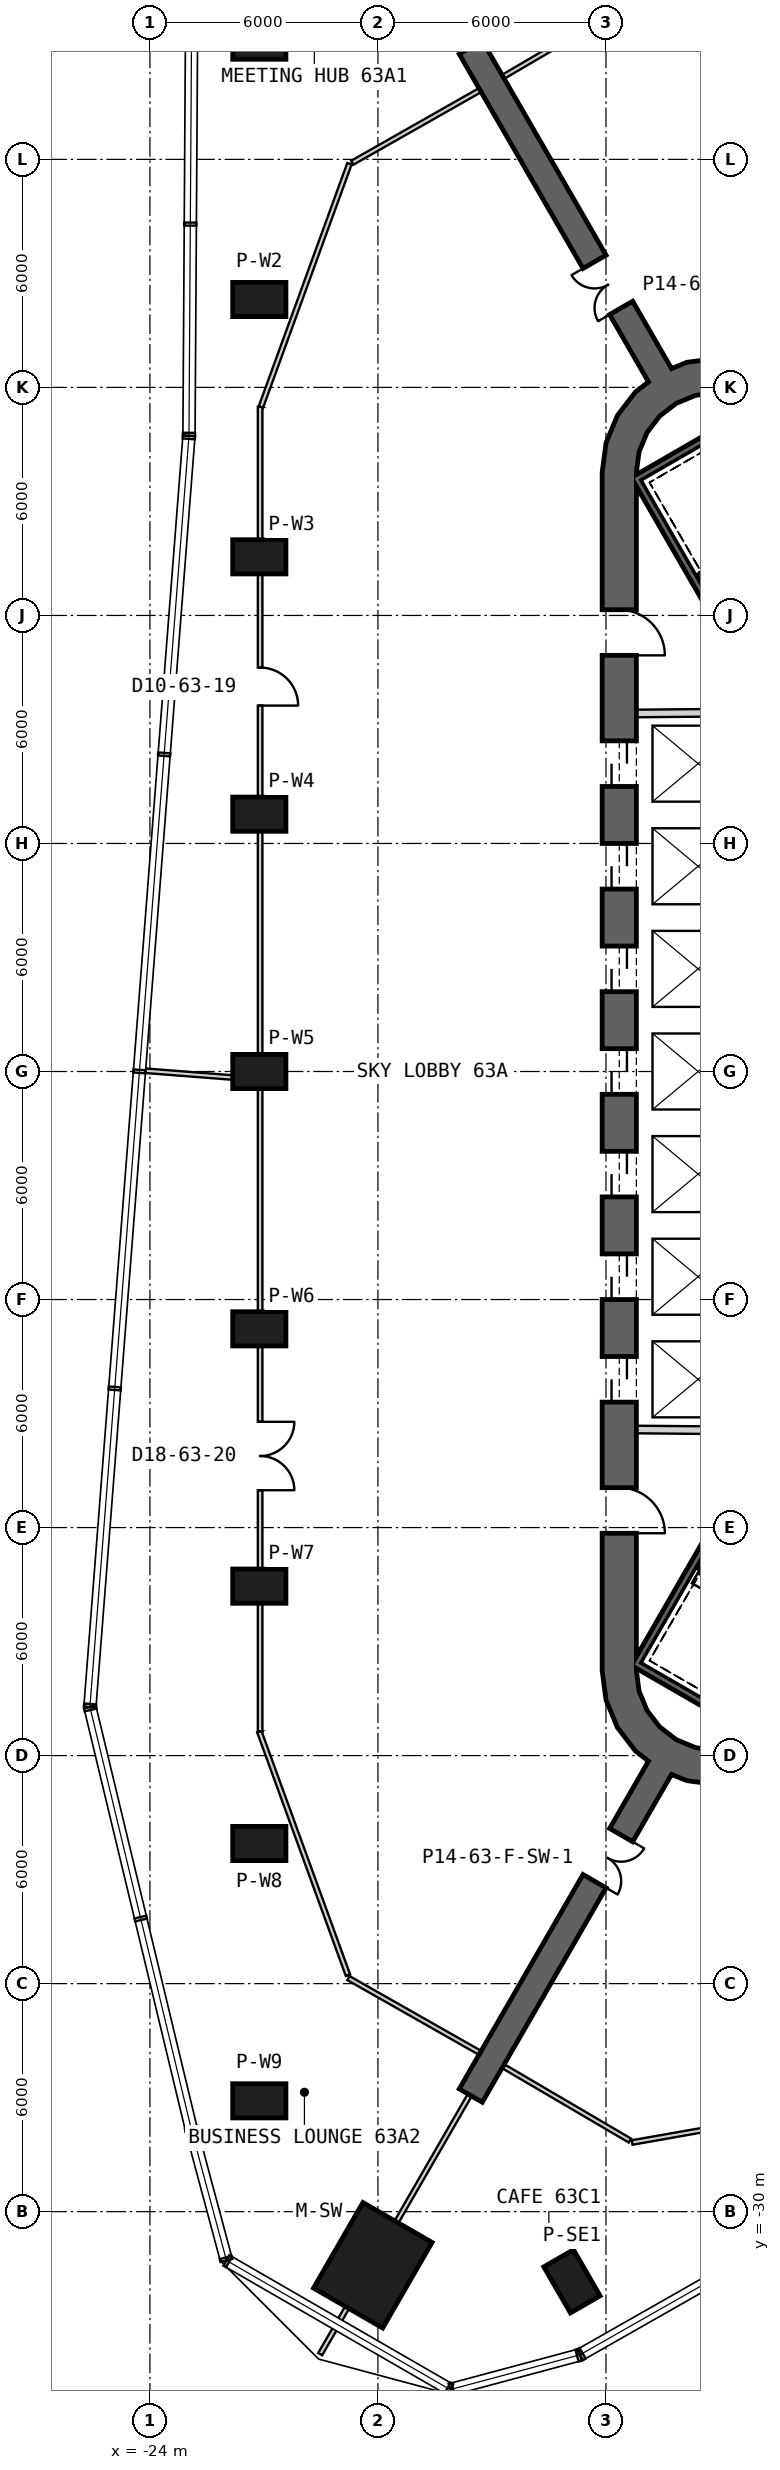
"""IFC4 building model, lengths in metres.
Left out: names, types, materials, properties, quantities, classifications, styles, units other than length and angle.
Written with IfcOpenShell. Run it as: python <this file> out.ifc"""

import sys

from ifc_helpers import new_model, si_unit, direction, frame, frame_2d, origin, origin_2d, place, context, subcontext, project, spatial, polyline, rectangle, outline, extrude, element, fill, save


model = new_model("IFC4")
c1 = context("Model", 3, precision=1e-05, world=origin(), true_north=direction((0.0, 1.0)))
c2 = subcontext(c1, "Body", "Model", "MODEL_VIEW")
j1 = project(units=[si_unit("LENGTHUNIT", "METRE"), si_unit("PLANEANGLEUNIT", "RADIAN")], contexts=[c1])
p1 = place(None, origin())
s1 = spatial("IfcSite", under=j1, at=p1, CompositionType="ELEMENT")
p2 = place(p1, origin())
s2 = spatial("IfcBuilding", under=s1, at=p2, CompositionType="ELEMENT")
p3 = place(p2, frame((0.0, 0.0, 277.2)))
s3 = spatial("IfcBuildingStorey", under=s2, at=p3, CompositionType="ELEMENT", Elevation=277.2)
p4 = place(p3, frame((-18.135, -31.411, 0.0), z_axis=(0.0, 0.0, 1.0), x_axis=(-0.5, -0.866025403784, 0.0)))
e1 = element("IfcColumn", 1, at=p4, inside=s3, PredefinedType="COLUMN", context=c2, shape_type="SweptSolid", body=[
    extrude(rectangle(XDim=2.6, YDim=2.1, at=origin_2d()), origin(), (0.0, 0.0, 1.0), 6.5),
])
for number, where, z_axis, x_axis in (
    (2, (-21.121, 27.084, 0.0), (0.0, 0.0, 1.0), (-1.0, 0.0, 0.0)),
    (3, (-21.121, 20.313, 0.0), (0.0, 0.0, 1.0), (-1.0, 0.0, 0.0)),
    (4, (-21.121, 13.542, 0.0), (0.0, 0.0, 1.0), (-1.0, 0.0, 0.0)),
    (5, (-21.121, 6.771, 0.0), (0.0, 0.0, 1.0), (-1.0, 0.0, 0.0)),
    (6, (-21.121, 0.0, 0.0), (0.0, 0.0, 1.0), (-1.0, 0.0, 0.0)),
    (7, (-21.121, -6.771, 0.0), (0.0, 0.0, 1.0), (-1.0, 0.0, 0.0)),
    (8, (-21.121, -13.542, 0.0), (0.0, 0.0, 1.0), (-1.0, 0.0, 0.0)),
    (9, (-21.121, -20.313, 0.0), (0.0, 0.0, 1.0), (-1.0, 0.0, 0.0)),
    (10, (-21.121, -27.084, 0.0), (0.0, 0.0, 1.0), (-1.0, 0.0, 0.0)),
    (11, (-12.895, -31.833, 0.0), (0.0, 0.0, 1.0), (0.5, -0.866, 0.0)),
):
    element("IfcColumn", number, at=place(p3, frame(where, z_axis=z_axis, x_axis=x_axis)), inside=s3, PredefinedType="COLUMN", context=c2, shape_type="SweptSolid", body=[
        extrude(rectangle(XDim=1.4, YDim=0.9, at=origin_2d()), origin(), (0.0, 0.0, 1.0), 6.5),
    ])
p5 = place(p3, frame((-11.65, 15.762, 0.0), z_axis=(0.0, 0.0, 1.0), x_axis=(0.0, -1.0, 0.0)))
e12 = element("IfcWall", 12, at=p5, inside=s3, PredefinedType="SHEAR", context=c2, shape_type="SweptSolid", body=[
    extrude(rectangle(XDim=31.523, YDim=0.9, at=frame_2d((15.762, 0.0))), origin(), (0.0, 0.0, 1.0), 6.5),
])
p6 = place(p5, frame((7.062, 0.0, 0.0)))
e13 = element("IfcOpeningElement", 13, at=p6, cuts=e12, PredefinedType="OPENING", context=c2, shape_type="SweptSolid", body=[
    extrude(rectangle(XDim=1.2, YDim=2.4, at=frame_2d((0.6, 1.2))), frame((0.0, 0.46, 0.0), z_axis=(0.0, -1.0, 0.0), x_axis=(1.0, 0.0, 0.0)), (0.0, 0.0, 1.0), 0.92),
])
p7 = place(p5, frame((9.762, 0.0, 0.0)))
e14 = element("IfcOpeningElement", 14, at=p7, cuts=e12, PredefinedType="OPENING", context=c2, shape_type="SweptSolid", body=[
    extrude(rectangle(XDim=1.2, YDim=2.4, at=frame_2d((0.6, 1.2))), frame((0.0, 0.46, 0.0), z_axis=(0.0, -1.0, 0.0), x_axis=(1.0, 0.0, 0.0)), (0.0, 0.0, 1.0), 0.92),
])
p8 = place(p5, frame((12.462, 0.0, 0.0)))
e15 = element("IfcOpeningElement", 15, at=p8, cuts=e12, PredefinedType="OPENING", context=c2, shape_type="SweptSolid", body=[
    extrude(rectangle(XDim=1.2, YDim=2.4, at=frame_2d((0.6, 1.2))), frame((0.0, 0.46, 0.0), z_axis=(0.0, -1.0, 0.0), x_axis=(1.0, 0.0, 0.0)), (0.0, 0.0, 1.0), 0.92),
])
p9 = place(p5, frame((15.162, 0.0, 0.0)))
e16 = element("IfcOpeningElement", 16, at=p9, cuts=e12, PredefinedType="OPENING", context=c2, shape_type="SweptSolid", body=[
    extrude(rectangle(XDim=1.2, YDim=2.4, at=frame_2d((0.6, 1.2))), frame((0.0, 0.46, 0.0), z_axis=(0.0, -1.0, 0.0), x_axis=(1.0, 0.0, 0.0)), (0.0, 0.0, 1.0), 0.92),
])
p10 = place(p5, frame((17.862, 0.0, 0.0)))
e17 = element("IfcOpeningElement", 17, at=p10, cuts=e12, PredefinedType="OPENING", context=c2, shape_type="SweptSolid", body=[
    extrude(rectangle(XDim=1.2, YDim=2.4, at=frame_2d((0.6, 1.2))), frame((0.0, 0.46, 0.0), z_axis=(0.0, -1.0, 0.0), x_axis=(1.0, 0.0, 0.0)), (0.0, 0.0, 1.0), 0.92),
])
p11 = place(p5, frame((20.562, 0.0, 0.0)))
e18 = element("IfcOpeningElement", 18, at=p11, cuts=e12, PredefinedType="OPENING", context=c2, shape_type="SweptSolid", body=[
    extrude(rectangle(XDim=1.2, YDim=2.4, at=frame_2d((0.6, 1.2))), frame((0.0, 0.46, 0.0), z_axis=(0.0, -1.0, 0.0), x_axis=(1.0, 0.0, 0.0)), (0.0, 0.0, 1.0), 0.92),
])
p12 = place(p5, frame((23.262, 0.0, 0.0)))
e19 = element("IfcOpeningElement", 19, at=p12, cuts=e12, PredefinedType="OPENING", context=c2, shape_type="SweptSolid", body=[
    extrude(rectangle(XDim=1.2, YDim=2.4, at=frame_2d((0.6, 1.2))), frame((0.0, 0.46, 0.0), z_axis=(0.0, -1.0, 0.0), x_axis=(1.0, 0.0, 0.0)), (0.0, 0.0, 1.0), 0.92),
])
p13 = place(p5, frame((3.612, 0.0, 0.0)))
e20 = element("IfcOpeningElement", 20, at=p13, cuts=e12, PredefinedType="OPENING", context=c2, shape_type="SweptSolid", body=[
    extrude(rectangle(XDim=1.2, YDim=2.4, at=frame_2d((0.6, 1.2))), frame((0.0, 0.46, 0.0), z_axis=(0.0, -1.0, 0.0), x_axis=(1.0, 0.0, 0.0)), (0.0, 0.0, 1.0), 0.92),
])
p14 = place(p5, frame((26.712, 0.0, 0.0)))
e21 = element("IfcOpeningElement", 21, at=p14, cuts=e12, PredefinedType="OPENING", context=c2, shape_type="SweptSolid", body=[
    extrude(rectangle(XDim=1.2, YDim=2.4, at=frame_2d((0.6, 1.2))), frame((0.0, 0.46, 0.0), z_axis=(0.0, -1.0, 0.0), x_axis=(1.0, 0.0, 0.0)), (0.0, 0.0, 1.0), 0.92),
])
p15 = place(p3, origin())
e22 = element("IfcWall", 22, at=p15, inside=s3, PredefinedType="SHEAR", context=c2, shape_type="SweptSolid", body=[
    extrude(outline(polyline([(-7.6, 18.36), (-8.323, 18.659), (-9.1, 18.762), (-9.876, 18.659), (-10.6, 18.36), (-11.221, 17.883), (-11.698, 17.262), (-11.998, 16.538), (-12.1, 15.762), (-11.2, 15.762), (-11.128, 16.305), (-10.919, 16.812), (-10.585, 17.247), (-10.15, 17.58), (-9.644, 17.79), (-9.1, 17.862), (-8.556, 17.79), (-8.05, 17.58), (-7.6, 18.36)])), origin(), (0.0, 0.0, 1.0), 6.5),
])
p16 = place(p3, origin())
e23 = element("IfcWall", 23, at=p16, inside=s3, PredefinedType="SHEAR", context=c2, shape_type="SweptSolid", body=[
    extrude(outline(polyline([(-12.1, -15.762), (-11.998, -16.538), (-11.698, -17.262), (-11.221, -17.883), (-10.6, -18.36), (-9.876, -18.659), (-9.1, -18.762), (-8.323, -18.659), (-7.6, -18.36), (-8.05, -17.58), (-8.556, -17.79), (-9.1, -17.862), (-9.644, -17.79), (-10.15, -17.58), (-10.585, -17.247), (-10.919, -16.812), (-11.128, -16.305), (-11.2, -15.762), (-12.1, -15.762)])), origin(), (0.0, 0.0, 1.0), 6.5),
])
p17 = place(p3, frame((-10.575, 18.316, 0.0), z_axis=(0.0, 0.0, 1.0), x_axis=(-0.500007350791, 0.866021159762, 0.0)))
e24 = element("IfcWall", 24, at=p17, inside=s3, PredefinedType="SHEAR", context=c2, shape_type="SweptSolid", body=[
    extrude(rectangle(XDim=9.965, YDim=0.7, at=frame_2d((4.982, 0.0))), origin(), (0.0, 0.0, 1.0), 6.5),
])
p18 = place(p17, frame((2.05, 0.0, 0.0)))
e25 = element("IfcOpeningElement", 25, at=p18, cuts=e24, PredefinedType="OPENING", context=c2, shape_type="SweptSolid", body=[
    extrude(rectangle(XDim=1.4, YDim=2.4, at=frame_2d((0.7, 1.2))), frame((0.0, 0.36, 0.0), z_axis=(0.0, -1.0, 0.0), x_axis=(1.0, 0.0, 0.0)), (0.0, 0.0, 1.0), 0.72),
])
p19 = place(p3, frame((-10.575, -18.316, 0.0), z_axis=(0.0, 0.0, 1.0), x_axis=(-0.500007350791, -0.866021159762, 0.0)))
e26 = element("IfcWall", 26, at=p19, inside=s3, PredefinedType="SHEAR", context=c2, shape_type="SweptSolid", body=[
    extrude(rectangle(XDim=9.965, YDim=0.7, at=frame_2d((4.982, 0.0))), origin(), (0.0, 0.0, 1.0), 6.5),
])
p20 = place(p19, frame((2.05, 0.0, 0.0)))
e27 = element("IfcOpeningElement", 27, at=p20, cuts=e26, PredefinedType="OPENING", context=c2, shape_type="SweptSolid", body=[
    extrude(rectangle(XDim=1.4, YDim=2.4, at=frame_2d((0.7, 1.2))), frame((0.0, 0.36, 0.0), z_axis=(0.0, -1.0, 0.0), x_axis=(1.0, 0.0, 0.0)), (0.0, 0.0, 1.0), 0.72),
])
p21 = place(p3, frame((-11.2, 9.42, 0.0), z_axis=(0.0, 0.0, 1.0), x_axis=(0.999957167047, 0.009255488683, 0.0)))
e28 = element("IfcWall", 28, at=p21, inside=s3, PredefinedType="PLUMBINGWALL", context=c2, shape_type="SweptSolid", body=[
    extrude(rectangle(XDim=3.35, YDim=0.2, at=frame_2d((1.675, 0.0))), origin(), (0.0, 0.0, 1.0), 6.1),
])
p22 = place(p3, frame((-8.05, -9.449, 0.0), z_axis=(0.0, 0.0, 1.0), x_axis=(-0.999957467379, 0.009222983926, 0.0)))
e29 = element("IfcWall", 29, at=p22, inside=s3, PredefinedType="PLUMBINGWALL", context=c2, shape_type="SweptSolid", body=[
    extrude(rectangle(XDim=3.15, YDim=0.2, at=frame_2d((1.575, 0.0))), origin(), (0.0, 0.0, 1.0), 6.1),
])
p23 = place(p3, frame((-11.245, 15.678, -0.35), z_axis=(0.0, 0.0, 1.0), x_axis=(0.499977274689, -0.866038523851, 0.0)))
e30 = element("IfcWall", 30, at=p23, inside=s3, PredefinedType="SHEAR", context=c2, shape_type="SweptSolid", body=[
    extrude(rectangle(XDim=8.1, YDim=0.2, at=frame_2d((4.05, 0.0))), origin(), (0.0, 0.0, 1.0), 6.45),
])
for number, where, z_axis, x_axis in (
    (31, (-7.818, 17.541, -0.35), (0.0, 0.0, 1.0), (-0.866, -0.5, 0.0)),
    (32, (-11.282, -15.541, -0.35), (0.0, 0.0, 1.0), (0.866, -0.5, 0.0)),
):
    element("IfcWall", number, at=place(p3, frame(where, z_axis=z_axis, x_axis=x_axis)), inside=s3, PredefinedType="SHEAR", context=c2, shape_type="SweptSolid", body=[
        extrude(rectangle(XDim=3.8, YDim=0.2, at=frame_2d((1.9, 0.0))), origin(), (0.0, 0.0, 1.0), 6.45),
    ])
p24 = place(p3, frame((-7.196, -8.663, -0.35), z_axis=(0.0, 0.0, 1.0), x_axis=(-0.499997992926, -0.866026562566, 0.0)))
e33 = element("IfcWall", 33, at=p24, inside=s3, PredefinedType="SHEAR", context=c2, shape_type="SweptSolid", body=[
    extrude(rectangle(XDim=7.9, YDim=0.2, at=frame_2d((3.95, 0.0))), origin(), (0.0, 0.0, 1.0), 6.45),
])
p25 = place(p3, frame((-21.1, 17.488, 0.0), z_axis=(0.0, 0.0, 1.0), x_axis=(0.0, -1.0, 0.0)))
e34 = element("IfcWall", 34, at=p25, inside=s3, PredefinedType="PARTITIONING", context=c2, shape_type="SweptSolid", body=[
    extrude(rectangle(XDim=17.706, YDim=0.12, at=frame_2d((8.853, 0.0))), origin(), (0.0, 0.0, 1.0), 6.1),
])
p26 = place(p25, frame((6.86, 0.0, 0.0)))
e35 = element("IfcOpeningElement", 35, at=p26, cuts=e34, PredefinedType="OPENING", context=c2, shape_type="SweptSolid", body=[
    extrude(rectangle(XDim=1.0, YDim=2.1, at=frame_2d((0.5, 1.05))), frame((0.0, 0.07, 0.0), z_axis=(0.0, -1.0, 0.0), x_axis=(1.0, 0.0, 0.0)), (0.0, 0.0, 1.0), 0.14),
])
p27 = place(p3, frame((-21.1, -0.218, 0.0), z_axis=(0.0, 0.0, 1.0), x_axis=(0.0, -1.0, 0.0)))
e36 = element("IfcWall", 36, at=p27, inside=s3, PredefinedType="PARTITIONING", context=c2, shape_type="SweptSolid", body=[
    extrude(rectangle(XDim=17.15, YDim=0.12, at=frame_2d((8.575, 0.0))), origin(), (0.0, 0.0, 1.0), 6.1),
])
p28 = place(p27, frame((9.0, 0.0, 0.0)))
e37 = element("IfcOpeningElement", 37, at=p28, cuts=e36, PredefinedType="OPENING", context=c2, shape_type="SweptSolid", body=[
    extrude(rectangle(XDim=1.8, YDim=2.1, at=frame_2d((0.9, 1.05))), frame((0.0, 0.07, 0.0), z_axis=(0.0, -1.0, 0.0), x_axis=(1.0, 0.0, 0.0)), (0.0, 0.0, 1.0), 0.14),
])
p29 = place(p3, frame((-18.75, 23.886, 0.0), z_axis=(0.0, 0.0, 1.0), x_axis=(-0.342042310023, -0.939684552472, 0.0)))
e38 = element("IfcWall", 38, at=p29, inside=s3, PredefinedType="PARTITIONING", context=c2, shape_type="SweptSolid", body=[
    extrude(rectangle(XDim=6.812, YDim=0.12, at=frame_2d((3.406, 0.0))), origin(), (0.0, 0.0, 1.0), 5.28),
])
p30 = place(p3, frame((-15.312, 25.822, 0.0), z_axis=(0.0, 0.0, 1.0), x_axis=(-0.869455941421, -0.494010491718, 0.0)))
e39 = element("IfcWall", 39, at=p30, inside=s3, PredefinedType="PARTITIONING", context=c2, shape_type="SweptSolid", body=[
    extrude(rectangle(XDim=3.869, YDim=0.12, at=frame_2d((1.935, 0.0))), origin(), (0.0, 0.0, 1.0), 5.28),
])
p31 = place(p3, frame((-18.776, -23.854, 0.0), z_axis=(0.0, 0.0, 1.0), x_axis=(0.869466128771, -0.493992561603, 0.0)))
e40 = element("IfcWall", 40, at=p31, inside=s3, PredefinedType="PARTITIONING", context=c2, shape_type="SweptSolid", body=[
    extrude(rectangle(XDim=3.984, YDim=0.12, at=frame_2d((1.992, 0.0))), origin(), (0.0, 0.0, 1.0), 5.28),
])
p32 = place(p3, frame((-21.121, -17.372, 0.0), z_axis=(0.0, 0.0, 1.0), x_axis=(0.342021948339, -0.939691963813, 0.0)))
e41 = element("IfcWall", 41, at=p32, inside=s3, PredefinedType="PARTITIONING", context=c2, shape_type="SweptSolid", body=[
    extrude(rectangle(XDim=6.818, YDim=0.12, at=frame_2d((3.409, 0.0))), origin(), (0.0, 0.0, 1.0), 5.38),
])
p33 = place(p3, frame((-21.16, -0.21, 0.0), z_axis=(0.0, 0.0, 1.0), x_axis=(-0.996976257669, 0.077706767045, 0.0)))
e42 = element("IfcWall", 42, at=p33, inside=s3, PredefinedType="PARTITIONING", context=c2, shape_type="SweptSolid", body=[
    extrude(rectangle(XDim=3.123, YDim=0.12, at=frame_2d((1.562, 0.0))), origin(), (0.0, 0.0, 1.0), 6.1),
])
p34 = place(p3, frame((-19.52, -33.75, 0.0), z_axis=(0.0, 0.0, 1.0), x_axis=(0.50006528296, 0.865987709369, 0.0)))
e43 = element("IfcWall", 43, at=p34, inside=s3, PredefinedType="PARTITIONING", context=c2, shape_type="SweptSolid", body=[
    extrude(rectangle(XDim=1.418, YDim=0.12, at=frame_2d((0.709, 0.0))), origin(), (0.0, 0.0, 1.0), 6.1),
])
p35 = place(p3, frame((-17.511, -30.27, 0.0), z_axis=(0.0, 0.0, 1.0), x_axis=(0.499980071345, 0.866036909293, 0.0)))
e44 = element("IfcWall", 44, at=p35, inside=s3, PredefinedType="PARTITIONING", context=c2, shape_type="SweptSolid", body=[
    extrude(rectangle(XDim=3.856, YDim=0.12, at=frame_2d((1.928, 0.0))), origin(), (0.0, 0.0, 1.0), 5.67),
])
p36 = place(p3, frame((-11.27, 28.188, 0.0), z_axis=(0.0, 0.0, 1.0), x_axis=(-0.862533821039, -0.505999414588, 0.0)))
e45 = element("IfcWall", 45, at=p36, inside=s3, PredefinedType="PARTITIONING", context=c2, shape_type="SweptSolid", body=[
    extrude(rectangle(XDim=3.984, YDim=0.12, at=frame_2d((1.992, 0.0))), origin(), (0.0, 0.0, 1.0), 5.28),
])
p37 = place(p3, frame((-11.311, -28.18, 0.0), z_axis=(0.0, 0.0, 1.0), x_axis=(0.984809524805, 0.173638129032, 0.0)))
e46 = element("IfcWall", 46, at=p37, inside=s3, PredefinedType="PARTITIONING", context=c2, shape_type="SweptSolid", body=[
    extrude(rectangle(XDim=6.812, YDim=0.12, at=frame_2d((3.406, 0.0))), origin(), (0.0, 0.0, 1.0), 5.28),
])
p38 = place(p3, frame((-14.706, -26.172, 0.0), z_axis=(0.0, 0.0, 1.0), x_axis=(0.862517562179, -0.506027128652, 0.0)))
e47 = element("IfcWall", 47, at=p38, inside=s3, PredefinedType="PARTITIONING", context=c2, shape_type="SweptSolid", body=[
    extrude(rectangle(XDim=3.869, YDim=0.12, at=frame_2d((1.935, 0.0))), origin(), (0.0, 0.0, 1.0), 5.28),
])
p39 = place(p26, origin())
e48 = element("IfcDoor", 48, at=p39, inside=s3, OperationType="SINGLE_SWING_RIGHT", PredefinedType="NOTDEFINED", context=c2, shape_type="SweptSolid", body=[
    extrude(rectangle(XDim=1.0, YDim=2.1, at=frame_2d((0.5, 1.05))), frame((0.0, 0.025, 0.0), z_axis=(0.0, -1.0, 0.0), x_axis=(1.0, 0.0, 0.0)), (0.0, 0.0, 1.0), 0.05),
])
fill(e35, e48)
p40 = place(p28, origin())
e49 = element("IfcDoor", 49, at=p40, inside=s3, OperationType="DOUBLE_DOOR_SINGLE_SWING", PredefinedType="NOTDEFINED", context=c2, shape_type="SweptSolid", body=[
    extrude(rectangle(XDim=1.8, YDim=2.1, at=frame_2d((0.9, 1.05))), frame((0.0, 0.025, 0.0), z_axis=(0.0, -1.0, 0.0), x_axis=(1.0, 0.0, 0.0)), (0.0, 0.0, 1.0), 0.05),
])
fill(e37, e49)
p41 = place(p6, origin())
e50 = element("IfcDoor", 50, at=p41, inside=s3, OperationType="SLIDING_TO_LEFT", PredefinedType="USERDEFINED", context=c2, shape_type="SweptSolid", body=[
    extrude(rectangle(XDim=1.2, YDim=2.4, at=frame_2d((0.6, 1.2))), frame((0.0, 0.025, 0.0), z_axis=(0.0, -1.0, 0.0), x_axis=(1.0, 0.0, 0.0)), (0.0, 0.0, 1.0), 0.05),
])
fill(e13, e50)
p42 = place(p7, origin())
e51 = element("IfcDoor", 51, at=p42, inside=s3, OperationType="SLIDING_TO_LEFT", PredefinedType="USERDEFINED", context=c2, shape_type="SweptSolid", body=[
    extrude(rectangle(XDim=1.2, YDim=2.4, at=frame_2d((0.6, 1.2))), frame((0.0, 0.025, 0.0), z_axis=(0.0, -1.0, 0.0), x_axis=(1.0, 0.0, 0.0)), (0.0, 0.0, 1.0), 0.05),
])
fill(e14, e51)
p43 = place(p8, origin())
e52 = element("IfcDoor", 52, at=p43, inside=s3, OperationType="SLIDING_TO_LEFT", PredefinedType="USERDEFINED", context=c2, shape_type="SweptSolid", body=[
    extrude(rectangle(XDim=1.2, YDim=2.4, at=frame_2d((0.6, 1.2))), frame((0.0, 0.025, 0.0), z_axis=(0.0, -1.0, 0.0), x_axis=(1.0, 0.0, 0.0)), (0.0, 0.0, 1.0), 0.05),
])
fill(e15, e52)
p44 = place(p9, origin())
e53 = element("IfcDoor", 53, at=p44, inside=s3, OperationType="SLIDING_TO_LEFT", PredefinedType="USERDEFINED", context=c2, shape_type="SweptSolid", body=[
    extrude(rectangle(XDim=1.2, YDim=2.4, at=frame_2d((0.6, 1.2))), frame((0.0, 0.025, 0.0), z_axis=(0.0, -1.0, 0.0), x_axis=(1.0, 0.0, 0.0)), (0.0, 0.0, 1.0), 0.05),
])
fill(e16, e53)
p45 = place(p10, origin())
e54 = element("IfcDoor", 54, at=p45, inside=s3, OperationType="SLIDING_TO_LEFT", PredefinedType="USERDEFINED", context=c2, shape_type="SweptSolid", body=[
    extrude(rectangle(XDim=1.2, YDim=2.4, at=frame_2d((0.6, 1.2))), frame((0.0, 0.025, 0.0), z_axis=(0.0, -1.0, 0.0), x_axis=(1.0, 0.0, 0.0)), (0.0, 0.0, 1.0), 0.05),
])
fill(e17, e54)
p46 = place(p11, origin())
e55 = element("IfcDoor", 55, at=p46, inside=s3, OperationType="SLIDING_TO_LEFT", PredefinedType="USERDEFINED", context=c2, shape_type="SweptSolid", body=[
    extrude(rectangle(XDim=1.2, YDim=2.4, at=frame_2d((0.6, 1.2))), frame((0.0, 0.025, 0.0), z_axis=(0.0, -1.0, 0.0), x_axis=(1.0, 0.0, 0.0)), (0.0, 0.0, 1.0), 0.05),
])
fill(e18, e55)
p47 = place(p12, origin())
e56 = element("IfcDoor", 56, at=p47, inside=s3, OperationType="SLIDING_TO_LEFT", PredefinedType="USERDEFINED", context=c2, shape_type="SweptSolid", body=[
    extrude(rectangle(XDim=1.2, YDim=2.4, at=frame_2d((0.6, 1.2))), frame((0.0, 0.025, 0.0), z_axis=(0.0, -1.0, 0.0), x_axis=(1.0, 0.0, 0.0)), (0.0, 0.0, 1.0), 0.05),
])
fill(e19, e56)
p48 = place(p13, origin())
e57 = element("IfcDoor", 57, at=p48, inside=s3, OperationType="SINGLE_SWING_RIGHT", PredefinedType="USERDEFINED", context=c2, shape_type="SweptSolid", body=[
    extrude(rectangle(XDim=1.2, YDim=2.4, at=frame_2d((0.6, 1.2))), frame((0.0, 0.025, 0.0), z_axis=(0.0, -1.0, 0.0), x_axis=(1.0, 0.0, 0.0)), (0.0, 0.0, 1.0), 0.05),
])
fill(e20, e57)
p49 = place(p14, origin())
e58 = element("IfcDoor", 58, at=p49, inside=s3, OperationType="SINGLE_SWING_RIGHT", PredefinedType="USERDEFINED", context=c2, shape_type="SweptSolid", body=[
    extrude(rectangle(XDim=1.2, YDim=2.4, at=frame_2d((0.6, 1.2))), frame((0.0, 0.025, 0.0), z_axis=(0.0, -1.0, 0.0), x_axis=(1.0, 0.0, 0.0)), (0.0, 0.0, 1.0), 0.05),
])
fill(e21, e58)
p50 = place(p18, origin())
e59 = element("IfcDoor", 59, at=p50, inside=s3, OperationType="DOUBLE_DOOR_SINGLE_SWING", PredefinedType="NOTDEFINED", context=c2, shape_type="SweptSolid", body=[
    extrude(rectangle(XDim=1.4, YDim=2.4, at=frame_2d((0.7, 1.2))), frame((0.0, 0.025, 0.0), z_axis=(0.0, -1.0, 0.0), x_axis=(1.0, 0.0, 0.0)), (0.0, 0.0, 1.0), 0.05),
])
fill(e25, e59)
p51 = place(p20, origin())
e60 = element("IfcDoor", 60, at=p51, inside=s3, OperationType="DOUBLE_DOOR_SINGLE_SWING", PredefinedType="NOTDEFINED", context=c2, shape_type="SweptSolid", body=[
    extrude(rectangle(XDim=1.4, YDim=2.4, at=frame_2d((0.7, 1.2))), frame((0.0, 0.025, 0.0), z_axis=(0.0, -1.0, 0.0), x_axis=(1.0, 0.0, 0.0)), (0.0, 0.0, 1.0), 0.05),
])
fill(e27, e60)
save(model, sys.argv[1])
